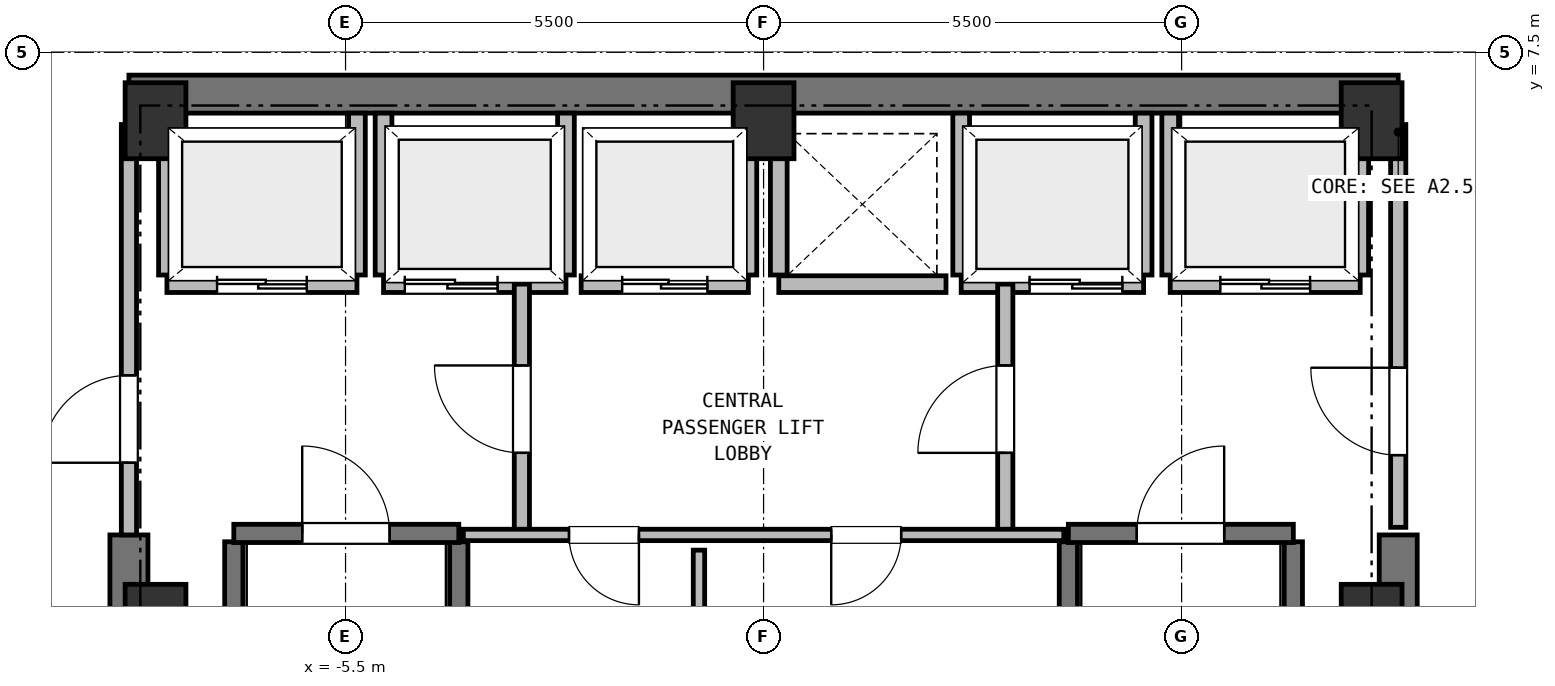
"""IFC4 building model, lengths in metres.
Left out: names, types, materials, properties, quantities, classifications, styles, units other than length and angle.
Written with IfcOpenShell. Run it as: python <this file> out.ifc"""

import sys

from ifc_helpers import new_model, si_unit, direction, frame, frame_2d, origin, origin_2d, place, context, subcontext, project, spatial, rectangle, extrude, element, fill, save


model = new_model("IFC4")
c1 = context("Model", 3, precision=1e-05, world=origin(), true_north=direction((0.0, 1.0)))
c2 = subcontext(c1, "Body", "Model", "MODEL_VIEW")
j1 = project(units=[si_unit("LENGTHUNIT", "METRE"), si_unit("PLANEANGLEUNIT", "RADIAN")], contexts=[c1])
p1 = place(None, origin())
s1 = spatial("IfcSite", under=j1, at=p1, CompositionType="ELEMENT")
p2 = place(p1, origin())
s2 = spatial("IfcBuilding", under=s1, at=p2, CompositionType="ELEMENT")
p3 = place(p2, frame((0.0, 0.0, 205.55)))
s3 = spatial("IfcBuildingStorey", under=s2, at=p3, CompositionType="ELEMENT", Elevation=205.55)
for number, where, z_axis, x_axis in (
    (1, (8.0, 0.0, 0.0), (0.0, 0.0, 1.0), (1.0, 0.0, 0.0)),
    (2, (8.0, 6.6, 0.0), (0.0, 0.0, 1.0), (1.0, 0.0, 0.0)),
    (3, (0.0, 6.6, 0.0), (0.0, 0.0, 1.0), (1.0, 0.0, 0.0)),
    (4, (-8.0, 6.6, 0.0), (0.0, 0.0, 1.0), (1.0, 0.0, 0.0)),
    (5, (-8.0, 0.0, 0.0), (0.0, 0.0, 1.0), (1.0, 0.0, 0.0)),
):
    element("IfcColumn", number, at=place(p3, frame(where, z_axis=z_axis, x_axis=x_axis)), inside=s3, PredefinedType="COLUMN", context=c2, shape_type="SweptSolid", body=[
        extrude(rectangle(XDim=0.8, YDim=1.0, at=origin_2d()), origin(), (0.0, 0.0, 1.0), 3.8),
    ])
p4 = place(p3, frame((-8.35, 6.95, 0.0), z_axis=(0.0, 0.0, 1.0), x_axis=(1.0, 0.0, 0.0)))
e6 = element("IfcWall", 6, at=p4, inside=s3, PredefinedType="SHEAR", context=c2, shape_type="SweptSolid", body=[
    extrude(rectangle(XDim=16.7, YDim=0.5, at=frame_2d((8.35, 0.0))), origin(), (0.0, 0.0, 1.0), 3.55),
])
for number, where, z_axis, x_axis in (
    (7, (-8.35, -6.95, 0.0), (0.0, 0.0, 1.0), (0.0, 1.0, 0.0)),
    (8, (8.35, -6.95, 0.0), (0.0, 0.0, 1.0), (0.0, 1.0, 0.0)),
):
    element("IfcWall", number, at=place(p3, frame(where, z_axis=z_axis, x_axis=x_axis)), inside=s3, PredefinedType="SHEAR", context=c2, shape_type="SweptSolid", body=[
        extrude(rectangle(XDim=8.1, YDim=0.5, at=frame_2d((4.05, 0.0))), origin(), (0.0, 0.0, 1.0), 3.55),
    ])
for number, where, z_axis, x_axis in (
    (9, (-6.97, -6.16, 0.0), (0.0, 0.0, 1.0), (0.0, 1.0, 0.0)),
    (10, (-4.01, -6.16, 0.0), (0.0, 0.0, 1.0), (0.0, 1.0, 0.0)),
):
    element("IfcWall", number, at=place(p3, frame(where, z_axis=z_axis, x_axis=x_axis)), inside=s3, PredefinedType="SHEAR", context=c2, shape_type="SweptSolid", body=[
        extrude(rectangle(XDim=7.22, YDim=0.24, at=frame_2d((3.61, 0.0))), origin(), (0.0, 0.0, 1.0), 3.55),
    ])
p5 = place(p3, frame((-6.97, 1.17, 0.0), z_axis=(0.0, 0.0, 1.0), x_axis=(1.0, 0.0, 0.0)))
e11 = element("IfcWall", 11, at=p5, inside=s3, PredefinedType="SHEAR", context=c2, shape_type="SweptSolid", body=[
    extrude(rectangle(XDim=2.96, YDim=0.24, at=frame_2d((1.48, 0.0))), origin(), (0.0, 0.0, 1.0), 3.55),
])
p6 = place(p5, frame((0.9, 0.0, 0.0)))
e12 = element("IfcOpeningElement", 12, at=p6, cuts=e11, PredefinedType="OPENING", context=c2, shape_type="SweptSolid", body=[
    extrude(rectangle(XDim=1.15, YDim=2.15, at=frame_2d((0.575, 1.075))), frame((0.0, 0.13, 0.0), z_axis=(0.0, -1.0, 0.0), x_axis=(1.0, 0.0, 0.0)), (0.0, 0.0, 1.0), 0.26),
])
for number, where, z_axis, x_axis in (
    (13, (4.01, -6.16, 0.0), (0.0, 0.0, 1.0), (0.0, 1.0, 0.0)),
    (14, (6.97, -6.16, 0.0), (0.0, 0.0, 1.0), (0.0, 1.0, 0.0)),
):
    element("IfcWall", number, at=place(p3, frame(where, z_axis=z_axis, x_axis=x_axis)), inside=s3, PredefinedType="SHEAR", context=c2, shape_type="SweptSolid", body=[
        extrude(rectangle(XDim=7.22, YDim=0.24, at=frame_2d((3.61, 0.0))), origin(), (0.0, 0.0, 1.0), 3.55),
    ])
p7 = place(p3, frame((4.01, 1.17, 0.0), z_axis=(0.0, 0.0, 1.0), x_axis=(1.0, 0.0, 0.0)))
e15 = element("IfcWall", 15, at=p7, inside=s3, PredefinedType="SHEAR", context=c2, shape_type="SweptSolid", body=[
    extrude(rectangle(XDim=2.96, YDim=0.24, at=frame_2d((1.48, 0.0))), origin(), (0.0, 0.0, 1.0), 3.55),
])
p8 = place(p7, frame((0.9, 0.0, 0.0)))
e16 = element("IfcOpeningElement", 16, at=p8, cuts=e15, PredefinedType="OPENING", context=c2, shape_type="SweptSolid", body=[
    extrude(rectangle(XDim=1.15, YDim=2.15, at=frame_2d((0.575, 1.075))), frame((0.0, 0.13, 0.0), z_axis=(0.0, -1.0, 0.0), x_axis=(1.0, 0.0, 0.0)), (0.0, 0.0, 1.0), 0.26),
])
p9 = place(p3, frame((-7.85, 4.45, 0.0), z_axis=(0.0, 0.0, 1.0), x_axis=(1.0, 0.0, 0.0)))
e17 = element("IfcWall", 17, at=p9, inside=s3, PredefinedType="PARTITIONING", context=c2, shape_type="SweptSolid", body=[
    extrude(rectangle(XDim=2.5, YDim=0.22, at=frame_2d((1.25, 0.0))), origin(), (0.0, 0.0, 1.0), 3.55),
])
p10 = place(p9, frame((0.66, 0.0, 0.0)))
e18 = element("IfcOpeningElement", 18, at=p10, cuts=e17, PredefinedType="OPENING", context=c2, shape_type="SweptSolid", body=[
    extrude(rectangle(XDim=1.18, YDim=2.15, at=frame_2d((0.59, 1.075))), frame((0.0, 0.12, 0.0), z_axis=(0.0, -1.0, 0.0), x_axis=(1.0, 0.0, 0.0)), (0.0, 0.0, 1.0), 0.24),
])
p11 = place(p3, frame((-7.85, 4.57, 0.0), z_axis=(0.0, 0.0, 1.0), x_axis=(0.0, 1.0, 0.0)))
e19 = element("IfcWall", 19, at=p11, inside=s3, PredefinedType="PARTITIONING", context=c2, shape_type="SweptSolid", body=[
    extrude(rectangle(XDim=2.13, YDim=0.22, at=frame_2d((1.065, 0.0))), origin(), (0.0, 0.0, 1.0), 3.18),
])
p12 = place(p3, frame((-5.35, 4.57, 0.0), z_axis=(0.0, 0.0, 1.0), x_axis=(0.0, 1.0, 0.0)))
e20 = element("IfcWall", 20, at=p12, inside=s3, PredefinedType="PARTITIONING", context=c2, shape_type="SweptSolid", body=[
    extrude(rectangle(XDim=2.13, YDim=0.22, at=frame_2d((1.065, 0.0))), origin(), (0.0, 0.0, 1.0), 3.55),
])
p13 = place(p3, frame((5.35, 4.45, 0.0), z_axis=(0.0, 0.0, 1.0), x_axis=(1.0, 0.0, 0.0)))
e21 = element("IfcWall", 21, at=p13, inside=s3, PredefinedType="PARTITIONING", context=c2, shape_type="SweptSolid", body=[
    extrude(rectangle(XDim=2.5, YDim=0.22, at=frame_2d((1.25, 0.0))), origin(), (0.0, 0.0, 1.0), 3.55),
])
p14 = place(p13, frame((0.66, 0.0, 0.0)))
e22 = element("IfcOpeningElement", 22, at=p14, cuts=e21, PredefinedType="OPENING", context=c2, shape_type="SweptSolid", body=[
    extrude(rectangle(XDim=1.18, YDim=2.15, at=frame_2d((0.59, 1.075))), frame((0.0, 0.12, 0.0), z_axis=(0.0, -1.0, 0.0), x_axis=(1.0, 0.0, 0.0)), (0.0, 0.0, 1.0), 0.24),
])
p15 = place(p3, frame((5.35, 4.57, 0.0), z_axis=(0.0, 0.0, 1.0), x_axis=(0.0, 1.0, 0.0)))
e23 = element("IfcWall", 23, at=p15, inside=s3, PredefinedType="PARTITIONING", context=c2, shape_type="SweptSolid", body=[
    extrude(rectangle(XDim=2.13, YDim=0.22, at=frame_2d((1.065, 0.0))), origin(), (0.0, 0.0, 1.0), 3.55),
])
p16 = place(p3, frame((7.85, 4.57, 0.0), z_axis=(0.0, 0.0, 1.0), x_axis=(0.0, 1.0, 0.0)))
e24 = element("IfcWall", 24, at=p16, inside=s3, PredefinedType="PARTITIONING", context=c2, shape_type="SweptSolid", body=[
    extrude(rectangle(XDim=2.13, YDim=0.22, at=frame_2d((1.065, 0.0))), origin(), (0.0, 0.0, 1.0), 3.18),
])
p17 = place(p3, frame((-5.0, 4.45, 0.0), z_axis=(0.0, 0.0, 1.0), x_axis=(1.0, 0.0, 0.0)))
e25 = element("IfcWall", 25, at=p17, inside=s3, PredefinedType="PARTITIONING", context=c2, shape_type="SweptSolid", body=[
    extrude(rectangle(XDim=2.4, YDim=0.22, at=frame_2d((1.2, 0.0))), origin(), (0.0, 0.0, 1.0), 3.55),
])
p18 = place(p17, frame((0.28, 0.0, 0.0)))
e26 = element("IfcOpeningElement", 26, at=p18, cuts=e25, PredefinedType="OPENING", context=c2, shape_type="SweptSolid", body=[
    extrude(rectangle(XDim=1.22, YDim=2.15, at=frame_2d((0.61, 1.075))), frame((0.0, 0.12, 0.0), z_axis=(0.0, -1.0, 0.0), x_axis=(1.0, 0.0, 0.0)), (0.0, 0.0, 1.0), 0.24),
])
for number, where, z_axis, x_axis in (
    (27, (-5.0, 4.57, 0.0), (0.0, 0.0, 1.0), (0.0, 1.0, 0.0)),
    (28, (-2.6, 4.57, 0.0), (0.0, 0.0, 1.0), (0.0, 1.0, 0.0)),
):
    element("IfcWall", number, at=place(p3, frame(where, z_axis=z_axis, x_axis=x_axis)), inside=s3, PredefinedType="PARTITIONING", context=c2, shape_type="SweptSolid", body=[
        extrude(rectangle(XDim=2.13, YDim=0.22, at=frame_2d((1.065, 0.0))), origin(), (0.0, 0.0, 1.0), 3.55),
    ])
p19 = place(p3, frame((2.6, 4.45, 0.0), z_axis=(0.0, 0.0, 1.0), x_axis=(1.0, 0.0, 0.0)))
e29 = element("IfcWall", 29, at=p19, inside=s3, PredefinedType="PARTITIONING", context=c2, shape_type="SweptSolid", body=[
    extrude(rectangle(XDim=2.4, YDim=0.22, at=frame_2d((1.2, 0.0))), origin(), (0.0, 0.0, 1.0), 3.55),
])
p20 = place(p19, frame((0.9, 0.0, 0.0)))
e30 = element("IfcOpeningElement", 30, at=p20, cuts=e29, PredefinedType="OPENING", context=c2, shape_type="SweptSolid", body=[
    extrude(rectangle(XDim=1.22, YDim=2.15, at=frame_2d((0.61, 1.075))), frame((0.0, 0.12, 0.0), z_axis=(0.0, -1.0, 0.0), x_axis=(1.0, 0.0, 0.0)), (0.0, 0.0, 1.0), 0.24),
])
for number, where, z_axis, x_axis in (
    (31, (2.6, 4.57, 0.0), (0.0, 0.0, 1.0), (0.0, 1.0, 0.0)),
    (32, (5.0, 4.57, 0.0), (0.0, 0.0, 1.0), (0.0, 1.0, 0.0)),
):
    element("IfcWall", number, at=place(p3, frame(where, z_axis=z_axis, x_axis=x_axis)), inside=s3, PredefinedType="PARTITIONING", context=c2, shape_type="SweptSolid", body=[
        extrude(rectangle(XDim=2.13, YDim=0.22, at=frame_2d((1.065, 0.0))), origin(), (0.0, 0.0, 1.0), 3.55),
    ])
p21 = place(p3, frame((-2.4, 4.45, 0.0), z_axis=(0.0, 0.0, 1.0), x_axis=(1.0, 0.0, 0.0)))
e33 = element("IfcWall", 33, at=p21, inside=s3, PredefinedType="PARTITIONING", context=c2, shape_type="SweptSolid", body=[
    extrude(rectangle(XDim=2.2, YDim=0.22, at=frame_2d((1.1, 0.0))), origin(), (0.0, 0.0, 1.0), 3.55),
])
p22 = place(p21, frame((0.54, 0.0, 0.0)))
e34 = element("IfcOpeningElement", 34, at=p22, cuts=e33, PredefinedType="OPENING", context=c2, shape_type="SweptSolid", body=[
    extrude(rectangle(XDim=1.12, YDim=2.15, at=frame_2d((0.56, 1.075))), frame((0.0, 0.12, 0.0), z_axis=(0.0, -1.0, 0.0), x_axis=(1.0, 0.0, 0.0)), (0.0, 0.0, 1.0), 0.24),
])
p23 = place(p3, frame((-0.2, 4.57, 0.0), z_axis=(0.0, 0.0, 1.0), x_axis=(0.0, 1.0, 0.0)))
e35 = element("IfcWall", 35, at=p23, inside=s3, PredefinedType="PARTITIONING", context=c2, shape_type="SweptSolid", body=[
    extrude(rectangle(XDim=2.13, YDim=0.22, at=frame_2d((1.065, 0.0))), origin(), (0.0, 0.0, 1.0), 3.55),
])
p24 = place(p3, frame((0.2, 4.45, 0.0), z_axis=(0.0, 0.0, 1.0), x_axis=(1.0, 0.0, 0.0)))
e36 = element("IfcWall", 36, at=p24, inside=s3, PredefinedType="PARTITIONING", context=c2, shape_type="SweptSolid", body=[
    extrude(rectangle(XDim=2.2, YDim=0.22, at=frame_2d((1.1, 0.0))), origin(), (0.0, 0.0, 1.0), 3.55),
])
p25 = place(p3, frame((0.2, 4.57, 0.0), z_axis=(0.0, 0.0, 1.0), x_axis=(0.0, 1.0, 0.0)))
e37 = element("IfcWall", 37, at=p25, inside=s3, PredefinedType="PARTITIONING", context=c2, shape_type="SweptSolid", body=[
    extrude(rectangle(XDim=2.13, YDim=0.22, at=frame_2d((1.065, 0.0))), origin(), (0.0, 0.0, 1.0), 3.55),
])
p26 = place(p3, frame((-3.18, 1.15, 0.0), z_axis=(0.0, 0.0, 1.0), x_axis=(0.0, 1.0, 0.0)))
e38 = element("IfcWall", 38, at=p26, inside=s3, PredefinedType="PARTITIONING", context=c2, shape_type="SweptSolid", body=[
    extrude(rectangle(XDim=3.3, YDim=0.2, at=frame_2d((1.65, 0.0))), origin(), (0.0, 0.0, 1.0), 3.55),
])
p27 = place(p26, frame((1.08, 0.0, 0.0)))
e39 = element("IfcOpeningElement", 39, at=p27, cuts=e38, PredefinedType="OPENING", context=c2, shape_type="SweptSolid", body=[
    extrude(rectangle(XDim=1.15, YDim=2.15, at=frame_2d((0.575, 1.075))), frame((0.0, 0.11, 0.0), z_axis=(0.0, -1.0, 0.0), x_axis=(1.0, 0.0, 0.0)), (0.0, 0.0, 1.0), 0.22),
])
p28 = place(p3, frame((3.18, 1.15, 0.0), z_axis=(0.0, 0.0, 1.0), x_axis=(0.0, 1.0, 0.0)))
e40 = element("IfcWall", 40, at=p28, inside=s3, PredefinedType="PARTITIONING", context=c2, shape_type="SweptSolid", body=[
    extrude(rectangle(XDim=3.3, YDim=0.2, at=frame_2d((1.65, 0.0))), origin(), (0.0, 0.0, 1.0), 3.55),
])
p29 = place(p28, frame((1.08, 0.0, 0.0)))
e41 = element("IfcOpeningElement", 41, at=p29, cuts=e40, PredefinedType="OPENING", context=c2, shape_type="SweptSolid", body=[
    extrude(rectangle(XDim=1.15, YDim=2.15, at=frame_2d((0.575, 1.075))), frame((0.0, 0.11, 0.0), z_axis=(0.0, -1.0, 0.0), x_axis=(1.0, 0.0, 0.0)), (0.0, 0.0, 1.0), 0.22),
])
p30 = place(p3, frame((-8.35, 1.15, 0.0), z_axis=(0.0, 0.0, 1.0), x_axis=(0.0, 1.0, 0.0)))
e42 = element("IfcWall", 42, at=p30, inside=s3, PredefinedType="PARTITIONING", context=c2, shape_type="SweptSolid", body=[
    extrude(rectangle(XDim=5.4, YDim=0.2, at=frame_2d((2.7, 0.0))), origin(), (0.0, 0.0, 1.0), 3.55),
])
p31 = place(p30, frame((0.95, 0.0, 0.0)))
e43 = element("IfcOpeningElement", 43, at=p31, cuts=e42, PredefinedType="OPENING", context=c2, shape_type="SweptSolid", body=[
    extrude(rectangle(XDim=1.15, YDim=2.15, at=frame_2d((0.575, 1.075))), frame((0.0, 0.11, 0.0), z_axis=(0.0, -1.0, 0.0), x_axis=(1.0, 0.0, 0.0)), (0.0, 0.0, 1.0), 0.22),
])
p32 = place(p3, frame((8.35, 1.25, 0.0), z_axis=(0.0, 0.0, 1.0), x_axis=(0.0, 1.0, 0.0)))
e44 = element("IfcWall", 44, at=p32, inside=s3, PredefinedType="PARTITIONING", context=c2, shape_type="SweptSolid", body=[
    extrude(rectangle(XDim=5.3, YDim=0.2, at=frame_2d((2.65, 0.0))), origin(), (0.0, 0.0, 1.0), 3.55),
])
p33 = place(p32, frame((0.95, 0.0, 0.0)))
e45 = element("IfcOpeningElement", 45, at=p33, cuts=e44, PredefinedType="OPENING", context=c2, shape_type="SweptSolid", body=[
    extrude(rectangle(XDim=1.15, YDim=2.15, at=frame_2d((0.575, 1.075))), frame((0.0, 0.11, 0.0), z_axis=(0.0, -1.0, 0.0), x_axis=(1.0, 0.0, 0.0)), (0.0, 0.0, 1.0), 0.22),
])
p34 = place(p3, frame((3.95, 1.15, 0.0), z_axis=(0.0, 0.0, 1.0), x_axis=(-1.0, 0.0, 0.0)))
e46 = element("IfcWall", 46, at=p34, inside=s3, PredefinedType="PARTITIONING", context=c2, shape_type="SweptSolid", body=[
    extrude(rectangle(XDim=7.9, YDim=0.15, at=frame_2d((3.95, 0.0))), origin(), (0.0, 0.0, 1.0), 3.55),
])
p35 = place(p34, frame((5.59, 0.0, 0.0)))
e47 = element("IfcOpeningElement", 47, at=p35, cuts=e46, PredefinedType="OPENING", context=c2, shape_type="SweptSolid", body=[
    extrude(rectangle(XDim=0.92, YDim=2.05, at=frame_2d((0.46, 1.025))), frame((0.0, 0.085, 0.0), z_axis=(0.0, -1.0, 0.0), x_axis=(1.0, 0.0, 0.0)), (0.0, 0.0, 1.0), 0.17),
])
p36 = place(p34, frame((2.14, 0.0, 0.0)))
e48 = element("IfcOpeningElement", 48, at=p36, cuts=e46, PredefinedType="OPENING", context=c2, shape_type="SweptSolid", body=[
    extrude(rectangle(XDim=0.92, YDim=2.05, at=frame_2d((0.46, 1.025))), frame((0.0, 0.085, 0.0), z_axis=(0.0, -1.0, 0.0), x_axis=(1.0, 0.0, 0.0)), (0.0, 0.0, 1.0), 0.17),
])
p37 = place(p3, frame((-0.85, -6.58, 0.0), z_axis=(0.0, 0.0, 1.0), x_axis=(0.0, 1.0, 0.0)))
e49 = element("IfcWall", 49, at=p37, inside=s3, PredefinedType="PARTITIONING", context=c2, shape_type="SweptSolid", body=[
    extrude(rectangle(XDim=7.53, YDim=0.15, at=frame_2d((3.765, 0.0))), origin(), (0.0, 0.0, 1.0), 3.55),
])
for number, where, z_axis, x_axis in (
    (50, (8.648, 9.171, 0.0), (0.0, 0.0, 1.0), (0.69, -0.724, 0.0)),
    (51, (-10.422, 7.309, 0.0), (0.0, 0.0, 1.0), (0.69, 0.724, 0.0)),
):
    element("IfcWall", number, at=place(p3, frame(where, z_axis=z_axis, x_axis=x_axis)), inside=s3, PredefinedType="PARTITIONING", context=c2, shape_type="SweptSolid", body=[
        extrude(rectangle(XDim=2.572, YDim=0.15, at=frame_2d((1.286, 0.0))), origin(), (0.0, 0.0, 1.0), 3.55),
    ])
p38 = place(p6, origin())
e52 = element("IfcDoor", 52, at=p38, inside=s3, OperationType="SINGLE_SWING_LEFT", PredefinedType="DOOR", context=c2, shape_type="SweptSolid", body=[
    extrude(rectangle(XDim=1.15, YDim=2.15, at=frame_2d((0.575, 1.075))), frame((0.0, 0.025, 0.0), z_axis=(0.0, -1.0, 0.0), x_axis=(1.0, 0.0, 0.0)), (0.0, 0.0, 1.0), 0.05),
])
fill(e12, e52)
p39 = place(p8, origin())
e53 = element("IfcDoor", 53, at=p39, inside=s3, OperationType="SINGLE_SWING_RIGHT", PredefinedType="DOOR", context=c2, shape_type="SweptSolid", body=[
    extrude(rectangle(XDim=1.15, YDim=2.15, at=frame_2d((0.575, 1.075))), frame((0.0, 0.025, 0.0), z_axis=(0.0, -1.0, 0.0), x_axis=(1.0, 0.0, 0.0)), (0.0, 0.0, 1.0), 0.05),
])
fill(e16, e53)
p40 = place(p10, origin())
e54 = element("IfcDoor", 54, at=p40, inside=s3, OperationType="DOUBLE_DOOR_SLIDING", PredefinedType="DOOR", context=c2, shape_type="SweptSolid", body=[
    extrude(rectangle(XDim=1.18, YDim=2.15, at=frame_2d((0.59, 1.075))), frame((0.0, 0.025, 0.0), z_axis=(0.0, -1.0, 0.0), x_axis=(1.0, 0.0, 0.0)), (0.0, 0.0, 1.0), 0.05),
])
fill(e18, e54)
p41 = place(p14, origin())
e55 = element("IfcDoor", 55, at=p41, inside=s3, OperationType="DOUBLE_DOOR_SLIDING", PredefinedType="DOOR", context=c2, shape_type="SweptSolid", body=[
    extrude(rectangle(XDim=1.18, YDim=2.15, at=frame_2d((0.59, 1.075))), frame((0.0, 0.025, 0.0), z_axis=(0.0, -1.0, 0.0), x_axis=(1.0, 0.0, 0.0)), (0.0, 0.0, 1.0), 0.05),
])
fill(e22, e55)
p42 = place(p18, origin())
e56 = element("IfcDoor", 56, at=p42, inside=s3, OperationType="DOUBLE_DOOR_SLIDING", PredefinedType="DOOR", context=c2, shape_type="SweptSolid", body=[
    extrude(rectangle(XDim=1.22, YDim=2.15, at=frame_2d((0.61, 1.075))), frame((0.0, 0.025, 0.0), z_axis=(0.0, -1.0, 0.0), x_axis=(1.0, 0.0, 0.0)), (0.0, 0.0, 1.0), 0.05),
])
fill(e26, e56)
p43 = place(p20, origin())
e57 = element("IfcDoor", 57, at=p43, inside=s3, OperationType="DOUBLE_DOOR_SLIDING", PredefinedType="DOOR", context=c2, shape_type="SweptSolid", body=[
    extrude(rectangle(XDim=1.22, YDim=2.15, at=frame_2d((0.61, 1.075))), frame((0.0, 0.025, 0.0), z_axis=(0.0, -1.0, 0.0), x_axis=(1.0, 0.0, 0.0)), (0.0, 0.0, 1.0), 0.05),
])
fill(e30, e57)
p44 = place(p22, origin())
e58 = element("IfcDoor", 58, at=p44, inside=s3, OperationType="DOUBLE_DOOR_SLIDING", PredefinedType="DOOR", context=c2, shape_type="SweptSolid", body=[
    extrude(rectangle(XDim=1.12, YDim=2.15, at=frame_2d((0.56, 1.075))), frame((0.0, 0.025, 0.0), z_axis=(0.0, -1.0, 0.0), x_axis=(1.0, 0.0, 0.0)), (0.0, 0.0, 1.0), 0.05),
])
fill(e34, e58)
p45 = place(p27, origin())
e59 = element("IfcDoor", 59, at=p45, inside=s3, OperationType="SINGLE_SWING_RIGHT", PredefinedType="DOOR", context=c2, shape_type="SweptSolid", body=[
    extrude(rectangle(XDim=1.15, YDim=2.15, at=frame_2d((0.575, 1.075))), frame((0.0, 0.025, 0.0), z_axis=(0.0, -1.0, 0.0), x_axis=(1.0, 0.0, 0.0)), (0.0, 0.0, 1.0), 0.05),
])
fill(e39, e59)
p46 = place(p29, origin())
e60 = element("IfcDoor", 60, at=p46, inside=s3, OperationType="SINGLE_SWING_LEFT", PredefinedType="DOOR", context=c2, shape_type="SweptSolid", body=[
    extrude(rectangle(XDim=1.15, YDim=2.15, at=frame_2d((0.575, 1.075))), frame((0.0, 0.025, 0.0), z_axis=(0.0, -1.0, 0.0), x_axis=(1.0, 0.0, 0.0)), (0.0, 0.0, 1.0), 0.05),
])
fill(e41, e60)
p47 = place(p31, origin())
e61 = element("IfcDoor", 61, at=p47, inside=s3, OperationType="SINGLE_SWING_LEFT", PredefinedType="DOOR", context=c2, shape_type="SweptSolid", body=[
    extrude(rectangle(XDim=1.15, YDim=2.15, at=frame_2d((0.575, 1.075))), frame((0.0, 0.025, 0.0), z_axis=(0.0, -1.0, 0.0), x_axis=(1.0, 0.0, 0.0)), (0.0, 0.0, 1.0), 0.05),
])
fill(e43, e61)
p48 = place(p33, origin())
e62 = element("IfcDoor", 62, at=p48, inside=s3, OperationType="SINGLE_SWING_RIGHT", PredefinedType="DOOR", context=c2, shape_type="SweptSolid", body=[
    extrude(rectangle(XDim=1.15, YDim=2.15, at=frame_2d((0.575, 1.075))), frame((0.0, 0.025, 0.0), z_axis=(0.0, -1.0, 0.0), x_axis=(1.0, 0.0, 0.0)), (0.0, 0.0, 1.0), 0.05),
])
fill(e45, e62)
p49 = place(p35, origin())
e63 = element("IfcDoor", 63, at=p49, inside=s3, OperationType="SINGLE_SWING_LEFT", PredefinedType="DOOR", context=c2, shape_type="SweptSolid", body=[
    extrude(rectangle(XDim=0.92, YDim=2.05, at=frame_2d((0.46, 1.025))), frame((0.0, 0.025, 0.0), z_axis=(0.0, -1.0, 0.0), x_axis=(1.0, 0.0, 0.0)), (0.0, 0.0, 1.0), 0.05),
])
fill(e47, e63)
p50 = place(p36, origin())
e64 = element("IfcDoor", 64, at=p50, inside=s3, OperationType="SINGLE_SWING_RIGHT", PredefinedType="DOOR", context=c2, shape_type="SweptSolid", body=[
    extrude(rectangle(XDim=0.92, YDim=2.05, at=frame_2d((0.46, 1.025))), frame((0.0, 0.025, 0.0), z_axis=(0.0, -1.0, 0.0), x_axis=(1.0, 0.0, 0.0)), (0.0, 0.0, 1.0), 0.05),
])
fill(e48, e64)
save(model, sys.argv[1])
